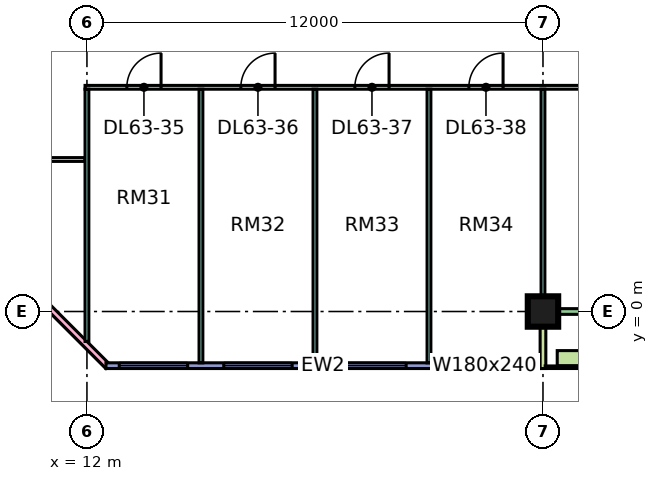
"""IFC4 building model, lengths in metres.
Left out: names, types, materials, properties, quantities, classifications, styles, units other than length and angle.
Written with IfcOpenShell. Run it as: python <this file> out.ifc"""

import sys

from ifc_helpers import new_model, si_unit, direction, frame, frame_2d, origin, origin_2d, place, context, subcontext, project, spatial, rectangle, extrude, element, fill, save


model = new_model("IFC4")
c1 = context("Model", 3, precision=1e-05, world=origin(), true_north=direction((0.0, 1.0)))
c2 = subcontext(c1, "Body", "Model", "MODEL_VIEW")
j1 = project(units=[si_unit("LENGTHUNIT", "METRE"), si_unit("PLANEANGLEUNIT", "RADIAN")], contexts=[c1])
p1 = place(None, origin())
s1 = spatial("IfcSite", under=j1, at=p1, CompositionType="ELEMENT")
p2 = place(p1, origin())
s2 = spatial("IfcBuilding", under=s1, at=p2, CompositionType="ELEMENT")
p3 = place(p2, frame((0.0, 0.0, 273.4)))
s3 = spatial("IfcBuildingStorey", under=s2, at=p3, CompositionType="ELEMENT", Elevation=273.4)
p4 = place(p3, frame((24.0, 0.0, 0.0), z_axis=(0.0, 0.0, 1.0), x_axis=(1.0, 0.0, 0.0)))
e1 = element("IfcColumn", 1, at=p4, inside=s3, PredefinedType="COLUMN", context=c2, shape_type="SweptSolid", body=[
    extrude(rectangle(XDim=0.8, YDim=0.8, at=origin_2d()), origin(), (0.0, 0.0, 1.0), 3.75),
])
p5 = place(p3, frame((-1.447, 12.553, 0.0), z_axis=(0.0, 0.0, 1.0), x_axis=(0.707106781187, -0.707106781187, 0.0)))
e2 = element("IfcWall", 2, at=p5, inside=s3, PredefinedType="SOLIDWALL", context=c2, shape_type="SweptSolid", body=[
    extrude(rectangle(XDim=19.799, YDim=0.15, at=frame_2d((9.899, 0.0))), origin(), (0.0, 0.0, 1.0), 3.35),
])
p6 = place(p5, frame((2.212, 0.0, 0.45)))
e3 = element("IfcOpeningElement", 3, at=p6, cuts=e2, PredefinedType="OPENING", context=c2, shape_type="SweptSolid", body=[
    extrude(rectangle(XDim=3.0, YDim=2.4, at=frame_2d((1.5, 1.2))), frame((0.0, 0.085, 0.0), z_axis=(0.0, -1.0, 0.0), x_axis=(1.0, 0.0, 0.0)), (0.0, 0.0, 1.0), 0.17),
])
p7 = place(p5, frame((10.216, 0.0, 0.45)))
e4 = element("IfcOpeningElement", 4, at=p7, cuts=e2, PredefinedType="OPENING", context=c2, shape_type="SweptSolid", body=[
    extrude(rectangle(XDim=3.0, YDim=2.4, at=frame_2d((1.5, 1.2))), frame((0.0, 0.085, 0.0), z_axis=(0.0, -1.0, 0.0), x_axis=(1.0, 0.0, 0.0)), (0.0, 0.0, 1.0), 0.17),
])
p8 = place(p3, frame((12.5, -1.425, 0.0), z_axis=(0.0, 0.0, 1.0), x_axis=(1.0, 0.0, 0.0)))
e5 = element("IfcWall", 5, at=p8, inside=s3, PredefinedType="SOLIDWALL", context=c2, shape_type="SweptSolid", body=[
    extrude(rectangle(XDim=11.425, YDim=0.15, at=frame_2d((5.712, 0.0))), origin(), (0.0, 0.0, 1.0), 3.35),
])
p9 = place(p8, frame((0.35, 0.0, 0.45)))
e6 = element("IfcOpeningElement", 6, at=p9, cuts=e5, PredefinedType="OPENING", context=c2, shape_type="SweptSolid", body=[
    extrude(rectangle(XDim=1.8, YDim=2.4, at=frame_2d((0.9, 1.2))), frame((0.0, 0.085, 0.0), z_axis=(0.0, -1.0, 0.0), x_axis=(1.0, 0.0, 0.0)), (0.0, 0.0, 1.0), 0.17),
])
p10 = place(p8, frame((3.1, 0.0, 0.45)))
e7 = element("IfcOpeningElement", 7, at=p10, cuts=e5, PredefinedType="OPENING", context=c2, shape_type="SweptSolid", body=[
    extrude(rectangle(XDim=1.8, YDim=2.4, at=frame_2d((0.9, 1.2))), frame((0.0, 0.085, 0.0), z_axis=(0.0, -1.0, 0.0), x_axis=(1.0, 0.0, 0.0)), (0.0, 0.0, 1.0), 0.17),
])
p11 = place(p8, frame((6.1, 0.0, 0.45)))
e8 = element("IfcOpeningElement", 8, at=p11, cuts=e5, PredefinedType="OPENING", context=c2, shape_type="SweptSolid", body=[
    extrude(rectangle(XDim=1.8, YDim=2.4, at=frame_2d((0.9, 1.2))), frame((0.0, 0.085, 0.0), z_axis=(0.0, -1.0, 0.0), x_axis=(1.0, 0.0, 0.0)), (0.0, 0.0, 1.0), 0.17),
])
p12 = place(p8, frame((9.062, 0.0, 0.45)))
e9 = element("IfcOpeningElement", 9, at=p12, cuts=e5, PredefinedType="OPENING", context=c2, shape_type="SweptSolid", body=[
    extrude(rectangle(XDim=1.8, YDim=2.4, at=frame_2d((0.9, 1.2))), frame((0.0, 0.085, 0.0), z_axis=(0.0, -1.0, 0.0), x_axis=(1.0, 0.0, 0.0)), (0.0, 0.0, 1.0), 0.17),
])
p13 = place(p3, frame((24.075, 0.0, 0.0), z_axis=(0.0, 0.0, 1.0), x_axis=(1.0, 0.0, 0.0)))
e10 = element("IfcWall", 10, at=p13, inside=s3, PredefinedType="SOLIDWALL", context=c2, shape_type="SweptSolid", body=[
    extrude(rectangle(XDim=11.85, YDim=0.15, at=frame_2d((5.925, 0.0))), origin(), (0.0, 0.0, 1.0), 3.35),
])
p14 = place(p13, frame((3.775, 0.0, 0.0)))
e11 = element("IfcOpeningElement", 11, at=p14, cuts=e10, PredefinedType="OPENING", context=c2, shape_type="SweptSolid", body=[
    extrude(rectangle(XDim=1.8, YDim=2.4, at=frame_2d((0.9, 1.2))), frame((0.0, 0.085, 0.0), z_axis=(0.0, -1.0, 0.0), x_axis=(1.0, 0.0, 0.0)), (0.0, 0.0, 1.0), 0.17),
])
p15 = place(p13, frame((9.275, 0.0, 0.45)))
e12 = element("IfcOpeningElement", 12, at=p15, cuts=e10, PredefinedType="OPENING", context=c2, shape_type="SweptSolid", body=[
    extrude(rectangle(XDim=1.8, YDim=2.4, at=frame_2d((0.9, 1.2))), frame((0.0, 0.085, 0.0), z_axis=(0.0, -1.0, 0.0), x_axis=(1.0, 0.0, 0.0)), (0.0, 0.0, 1.0), 0.17),
])
p16 = place(p3, frame((24.0, -1.5, 0.0), z_axis=(0.0, 0.0, 1.0), x_axis=(0.0, 1.0, 0.0)))
e13 = element("IfcWall", 13, at=p16, inside=s3, PredefinedType="SOLIDWALL", context=c2, shape_type="SweptSolid", body=[
    extrude(rectangle(XDim=1.5, YDim=0.15, at=frame_2d((0.75, 0.0))), origin(), (0.0, 0.0, 1.0), 3.35),
])
p17 = place(p3, frame((24.375, -1.229, 0.0), z_axis=(0.0, 0.0, 1.0), x_axis=(1.0, 0.0, 0.0)))
e14 = element("IfcWall", 14, at=p17, inside=s3, PredefinedType="SOLIDWALL", context=c2, shape_type="SweptSolid", body=[
    extrude(rectangle(XDim=11.25, YDim=0.4, at=frame_2d((5.625, 0.0))), origin(), (0.0, 0.0, 1.0), 0.7),
])
p18 = place(p3, frame((9.05, 4.0, 0.0), z_axis=(0.0, 0.0, 1.0), x_axis=(1.0, 0.0, 0.0)))
e15 = element("IfcWall", 15, at=p18, inside=s3, PredefinedType="PARTITIONING", context=c2, shape_type="SweptSolid", body=[
    extrude(rectangle(XDim=2.9, YDim=0.1, at=frame_2d((1.45, 0.0))), origin(), (0.0, 0.0, 1.0), 3.35),
])
p19 = place(p3, frame((11.95, 5.9, 0.0), z_axis=(0.0, 0.0, 1.0), x_axis=(1.0, 0.0, 0.0)))
e16 = element("IfcWall", 16, at=p19, inside=s3, PredefinedType="PARTITIONING", context=c2, shape_type="SweptSolid", body=[
    extrude(rectangle(XDim=21.1, YDim=0.1, at=frame_2d((10.55, 0.0))), origin(), (0.0, 0.0, 1.0), 3.35),
])
p20 = place(p19, frame((1.1, 0.0, 0.0)))
e17 = element("IfcOpeningElement", 17, at=p20, cuts=e16, PredefinedType="OPENING", context=c2, shape_type="SweptSolid", body=[
    extrude(rectangle(XDim=0.9, YDim=2.1, at=frame_2d((0.45, 1.05))), frame((0.0, 0.06, 0.0), z_axis=(0.0, -1.0, 0.0), x_axis=(1.0, 0.0, 0.0)), (0.0, 0.0, 1.0), 0.12),
])
p21 = place(p19, frame((4.1, 0.0, 0.0)))
e18 = element("IfcOpeningElement", 18, at=p21, cuts=e16, PredefinedType="OPENING", context=c2, shape_type="SweptSolid", body=[
    extrude(rectangle(XDim=0.9, YDim=2.1, at=frame_2d((0.45, 1.05))), frame((0.0, 0.06, 0.0), z_axis=(0.0, -1.0, 0.0), x_axis=(1.0, 0.0, 0.0)), (0.0, 0.0, 1.0), 0.12),
])
p22 = place(p19, frame((7.1, 0.0, 0.0)))
e19 = element("IfcOpeningElement", 19, at=p22, cuts=e16, PredefinedType="OPENING", context=c2, shape_type="SweptSolid", body=[
    extrude(rectangle(XDim=0.9, YDim=2.1, at=frame_2d((0.45, 1.05))), frame((0.0, 0.06, 0.0), z_axis=(0.0, -1.0, 0.0), x_axis=(1.0, 0.0, 0.0)), (0.0, 0.0, 1.0), 0.12),
])
p23 = place(p19, frame((10.1, 0.0, 0.0)))
e20 = element("IfcOpeningElement", 20, at=p23, cuts=e16, PredefinedType="OPENING", context=c2, shape_type="SweptSolid", body=[
    extrude(rectangle(XDim=0.9, YDim=2.1, at=frame_2d((0.45, 1.05))), frame((0.0, 0.06, 0.0), z_axis=(0.0, -1.0, 0.0), x_axis=(1.0, 0.0, 0.0)), (0.0, 0.0, 1.0), 0.12),
])
p24 = place(p19, frame((16.1, 0.0, 0.0)))
e21 = element("IfcOpeningElement", 21, at=p24, cuts=e16, PredefinedType="OPENING", context=c2, shape_type="SweptSolid", body=[
    extrude(rectangle(XDim=0.9, YDim=2.1, at=frame_2d((0.45, 1.05))), frame((0.0, 0.06, 0.0), z_axis=(0.0, -1.0, 0.0), x_axis=(1.0, 0.0, 0.0)), (0.0, 0.0, 1.0), 0.12),
])
p25 = place(p3, frame((12.0, -0.788, 0.0), z_axis=(0.0, 0.0, 1.0), x_axis=(0.0, 1.0, 0.0)))
e22 = element("IfcWall", 22, at=p25, inside=s3, PredefinedType="PARTITIONING", context=c2, shape_type="SweptSolid", body=[
    extrude(rectangle(XDim=6.638, YDim=0.1, at=frame_2d((3.319, 0.0))), origin(), (0.0, 0.0, 1.0), 3.35),
])
for number, where, z_axis, x_axis in (
    (23, (15.0, -1.351, 0.0), (0.0, 0.0, 1.0), (0.0, 1.0, 0.0)),
    (24, (18.0, -1.351, 0.0), (0.0, 0.0, 1.0), (0.0, 1.0, 0.0)),
    (25, (21.0, -1.351, 0.0), (0.0, 0.0, 1.0), (0.0, 1.0, 0.0)),
):
    element("IfcWall", number, at=place(p3, frame(where, z_axis=z_axis, x_axis=x_axis)), inside=s3, PredefinedType="PARTITIONING", context=c2, shape_type="SweptSolid", body=[
        extrude(rectangle(XDim=7.201, YDim=0.1, at=frame_2d((3.601, 0.0))), origin(), (0.0, 0.0, 1.0), 3.35),
    ])
p26 = place(p3, frame((24.0, 0.0, 0.0), z_axis=(0.0, 0.0, 1.0), x_axis=(0.0, 1.0, 0.0)))
e26 = element("IfcWall", 26, at=p26, inside=s3, PredefinedType="PARTITIONING", context=c2, shape_type="SweptSolid", body=[
    extrude(rectangle(XDim=5.85, YDim=0.1, at=frame_2d((2.925, 0.0))), origin(), (0.0, 0.0, 1.0), 3.35),
])
p27 = place(p9, origin())
e27 = element("IfcWindow", 27, at=p27, inside=s3, PartitioningType="SINGLE_PANEL", PredefinedType="WINDOW", context=c2, shape_type="SweptSolid", body=[
    extrude(rectangle(XDim=1.8, YDim=2.4, at=frame_2d((0.9, 1.2))), frame((0.0, 0.03, 0.0), z_axis=(0.0, -1.0, 0.0), x_axis=(1.0, 0.0, 0.0)), (0.0, 0.0, 1.0), 0.06),
])
fill(e6, e27)
p28 = place(p10, origin())
e28 = element("IfcWindow", 28, at=p28, inside=s3, PartitioningType="SINGLE_PANEL", PredefinedType="WINDOW", context=c2, shape_type="SweptSolid", body=[
    extrude(rectangle(XDim=1.8, YDim=2.4, at=frame_2d((0.9, 1.2))), frame((0.0, 0.03, 0.0), z_axis=(0.0, -1.0, 0.0), x_axis=(1.0, 0.0, 0.0)), (0.0, 0.0, 1.0), 0.06),
])
fill(e7, e28)
p29 = place(p11, origin())
e29 = element("IfcWindow", 29, at=p29, inside=s3, PartitioningType="SINGLE_PANEL", PredefinedType="WINDOW", context=c2, shape_type="SweptSolid", body=[
    extrude(rectangle(XDim=1.8, YDim=2.4, at=frame_2d((0.9, 1.2))), frame((0.0, 0.03, 0.0), z_axis=(0.0, -1.0, 0.0), x_axis=(1.0, 0.0, 0.0)), (0.0, 0.0, 1.0), 0.06),
])
fill(e8, e29)
p30 = place(p12, origin())
e30 = element("IfcWindow", 30, at=p30, inside=s3, PartitioningType="SINGLE_PANEL", PredefinedType="WINDOW", context=c2, shape_type="SweptSolid", body=[
    extrude(rectangle(XDim=1.8, YDim=2.4, at=frame_2d((0.9, 1.2))), frame((0.0, 0.03, 0.0), z_axis=(0.0, -1.0, 0.0), x_axis=(1.0, 0.0, 0.0)), (0.0, 0.0, 1.0), 0.06),
])
fill(e9, e30)
p31 = place(p20, frame((0.9, 0.0, 0.0), z_axis=(0.0, 0.0, 1.0), x_axis=(-1.0, 0.0, 0.0)))
e31 = element("IfcDoor", 31, at=p31, inside=s3, OperationType="SINGLE_SWING_RIGHT", PredefinedType="DOOR", context=c2, shape_type="SweptSolid", body=[
    extrude(rectangle(XDim=0.9, YDim=2.1, at=frame_2d((0.45, 1.05))), frame((0.0, 0.025, 0.0), z_axis=(0.0, -1.0, 0.0), x_axis=(1.0, 0.0, 0.0)), (0.0, 0.0, 1.0), 0.05),
])
fill(e17, e31)
p32 = place(p21, frame((0.9, 0.0, 0.0), z_axis=(0.0, 0.0, 1.0), x_axis=(-1.0, 0.0, 0.0)))
e32 = element("IfcDoor", 32, at=p32, inside=s3, OperationType="SINGLE_SWING_RIGHT", PredefinedType="DOOR", context=c2, shape_type="SweptSolid", body=[
    extrude(rectangle(XDim=0.9, YDim=2.1, at=frame_2d((0.45, 1.05))), frame((0.0, 0.025, 0.0), z_axis=(0.0, -1.0, 0.0), x_axis=(1.0, 0.0, 0.0)), (0.0, 0.0, 1.0), 0.05),
])
fill(e18, e32)
p33 = place(p22, frame((0.9, 0.0, 0.0), z_axis=(0.0, 0.0, 1.0), x_axis=(-1.0, 0.0, 0.0)))
e33 = element("IfcDoor", 33, at=p33, inside=s3, OperationType="SINGLE_SWING_RIGHT", PredefinedType="DOOR", context=c2, shape_type="SweptSolid", body=[
    extrude(rectangle(XDim=0.9, YDim=2.1, at=frame_2d((0.45, 1.05))), frame((0.0, 0.025, 0.0), z_axis=(0.0, -1.0, 0.0), x_axis=(1.0, 0.0, 0.0)), (0.0, 0.0, 1.0), 0.05),
])
fill(e19, e33)
p34 = place(p23, frame((0.9, 0.0, 0.0), z_axis=(0.0, 0.0, 1.0), x_axis=(-1.0, 0.0, 0.0)))
e34 = element("IfcDoor", 34, at=p34, inside=s3, OperationType="SINGLE_SWING_RIGHT", PredefinedType="DOOR", context=c2, shape_type="SweptSolid", body=[
    extrude(rectangle(XDim=0.9, YDim=2.1, at=frame_2d((0.45, 1.05))), frame((0.0, 0.025, 0.0), z_axis=(0.0, -1.0, 0.0), x_axis=(1.0, 0.0, 0.0)), (0.0, 0.0, 1.0), 0.05),
])
fill(e20, e34)
save(model, sys.argv[1])
